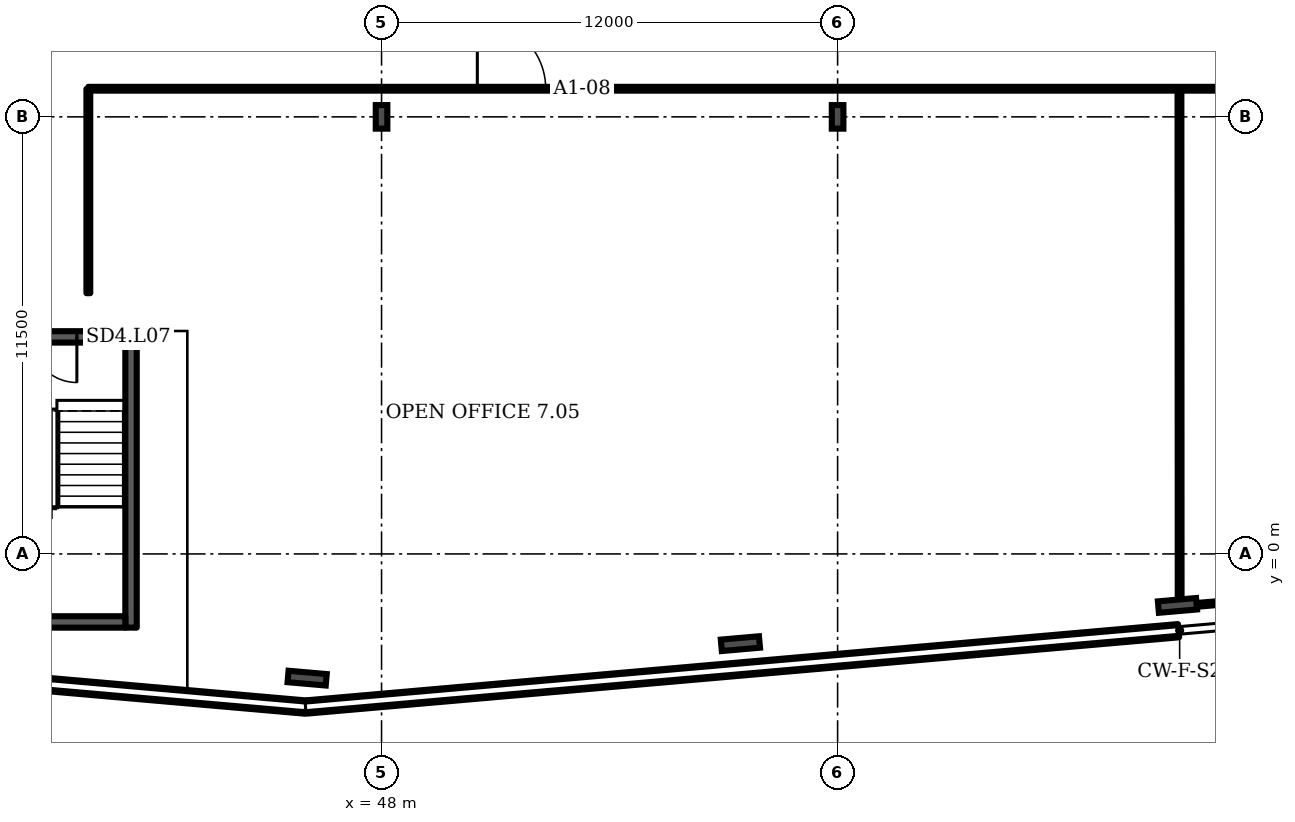
"""IFC4 building model, lengths in metres.
Left out: names, types, materials, properties, quantities, classifications, styles, units other than length and angle.
Written with IfcOpenShell. Run it as: python <this file> out.ifc"""

import sys

from ifc_helpers import new_model, si_unit, direction, frame, frame_2d, origin, origin_2d, place, context, subcontext, project, spatial, rectangle, i_section, extrude, element, fill, save


model = new_model("IFC4")
c1 = context("Model", 3, precision=1e-05, world=origin(), true_north=direction((0.0, 1.0)))
c2 = subcontext(c1, "Body", "Model", "MODEL_VIEW")
j1 = project(units=[si_unit("LENGTHUNIT", "METRE"), si_unit("PLANEANGLEUNIT", "RADIAN")], contexts=[c1])
p1 = place(None, origin())
s1 = spatial("IfcSite", under=j1, at=p1, CompositionType="ELEMENT")
p2 = place(p1, origin())
s2 = spatial("IfcBuilding", under=s1, at=p2, CompositionType="ELEMENT")
p3 = place(p2, frame((0.0, 0.0, 45.1)))
s3 = spatial("IfcBuildingStorey", under=s2, at=p3, CompositionType="ELEMENT", Elevation=45.1)
for number, where, z_axis, x_axis in (
    (1, (46.042, -3.268, 0.0), (0.0, 0.0, 1.0), (-0.087, -0.996, 0.0)),
    (2, (57.442, -2.361, 0.0), (0.0, 0.0, 1.0), (0.087, -0.996, 0.0)),
    (3, (68.942, -1.355, 0.0), (0.0, 0.0, 1.0), (0.087, -0.996, 0.0)),
):
    element("IfcColumn", number, at=place(p3, frame(where, z_axis=z_axis, x_axis=x_axis)), inside=s3, PredefinedType="COLUMN", context=c2, shape_type="SweptSolid", body=[
        extrude(i_section(OverallWidth=0.302, OverallDepth=1.008, WebThickness=0.021, FlangeThickness=0.04, FilletRadius=0.03, at=origin_2d()), origin(), (0.0, 0.0, 1.0), 3.6),
    ])
for number, where, z_axis, x_axis in (
    (4, (48.0, 11.5, 0.0), (0.0, 0.0, 1.0), (1.0, 0.0, 0.0)),
    (5, (60.0, 11.5, 0.0), (0.0, 0.0, 1.0), (1.0, 0.0, 0.0)),
):
    element("IfcColumn", number, at=place(p3, frame(where, z_axis=z_axis, x_axis=x_axis)), inside=s3, PredefinedType="COLUMN", context=c2, shape_type="SweptSolid", body=[
        extrude(i_section(OverallWidth=0.305, OverallDepth=0.62, WebThickness=0.021, FlangeThickness=0.04, FilletRadius=0.027, at=origin_2d()), origin(), (0.0, 0.0, 1.0), 3.6),
    ])
p4 = place(p3, frame((34.601, -3.032, 0.0), z_axis=(0.0, 0.0, 1.0), x_axis=(0.996193, -0.087148, 0.0)))
e6 = element("IfcWall", 6, at=p4, inside=s3, PredefinedType="SOLIDWALL", context=c2, shape_type="SweptSolid", body=[
    extrude(rectangle(XDim=11.458, YDim=0.35, at=frame_2d((5.729, 0.0))), origin(), (0.0, 0.0, 1.0), 1.0),
])
p5 = place(p3, frame((46.045, -4.026, 0.0), z_axis=(0.0, 0.0, 1.0), x_axis=(0.99619, 0.087163, 0.0)))
e7 = element("IfcWall", 7, at=p5, inside=s3, PredefinedType="SOLIDWALL", context=c2, shape_type="SweptSolid", body=[
    extrude(rectangle(XDim=23.013, YDim=0.35, at=frame_2d((11.506, 0.0))), origin(), (0.0, 0.0, 1.0), 1.0),
])
p6 = place(p3, frame((37.208, 5.711, 0.0), z_axis=(0.0, 0.0, 1.0), x_axis=(1.0, 0.0, 0.0)))
e8 = element("IfcWall", 8, at=p6, inside=s3, PredefinedType="SHEAR", context=c2, shape_type="SweptSolid", body=[
    extrude(rectangle(XDim=4.35, YDim=0.3, at=frame_2d((2.175, 0.0))), origin(), (0.0, 0.0, 1.0), 3.2),
])
p7 = place(p6, frame((1.575, 0.0, 0.0)))
e9 = element("IfcOpeningElement", 9, at=p7, cuts=e8, PredefinedType="OPENING", context=c2, shape_type="SweptSolid", body=[
    extrude(rectangle(XDim=1.2, YDim=2.1, at=frame_2d((0.6, 1.05))), frame((0.0, 0.16, 0.0), z_axis=(0.0, -1.0, 0.0), x_axis=(1.0, 0.0, 0.0)), (0.0, 0.0, 1.0), 0.32),
])
p8 = place(p3, frame((40.285, 6.861, 0.0), z_axis=(0.0, 0.0, 1.0), x_axis=(0.0, 1.0, 0.0)))
e10 = element("IfcWall", 10, at=p8, inside=s3, PredefinedType="PARTITIONING", context=c2, shape_type="SweptSolid", body=[
    extrude(rectangle(XDim=5.375, YDim=0.1, at=frame_2d((2.687, 0.0))), origin(), (0.0, 0.0, 1.0), 3.2),
])
p9 = place(p3, frame((40.285, 12.24, 0.0), z_axis=(0.0, 0.0, 1.0), x_axis=(1.0, 0.0, 0.0)))
e11 = element("IfcWall", 11, at=p9, inside=s3, PredefinedType="PARTITIONING", context=c2, shape_type="SweptSolid", body=[
    extrude(rectangle(XDim=33.255, YDim=0.1, at=frame_2d((16.627, 0.0))), origin(), (0.0, 0.0, 1.0), 3.2),
])
p10 = place(p9, frame((10.235, 0.0, 0.0)))
e12 = element("IfcOpeningElement", 12, at=p10, cuts=e11, PredefinedType="OPENING", context=c2, shape_type="SweptSolid", body=[
    extrude(rectangle(XDim=1.8, YDim=2.1, at=frame_2d((0.9, 1.05))), frame((0.0, 0.06, 0.0), z_axis=(0.0, -1.0, 0.0), x_axis=(1.0, 0.0, 0.0)), (0.0, 0.0, 1.0), 0.12),
])
p11 = place(p3, frame((69.0, -1.38, 0.0), z_axis=(0.0, 0.0, 1.0), x_axis=(-0.000359, 1.000002, 0.0)))
e13 = element("IfcWall", 13, at=p11, inside=s3, PredefinedType="PARTITIONING", context=c2, shape_type="SweptSolid", body=[
    extrude(rectangle(XDim=13.615, YDim=0.1, at=frame_2d((6.808, 0.0))), origin(), (0.0, 0.0, 1.0), 3.2),
])
p12 = place(p3, frame((69.0, -1.38, 0.0), z_axis=(0.0, 0.0, 1.0), x_axis=(0.996261, 0.086427, 0.0)))
e14 = element("IfcWall", 14, at=p12, inside=s3, PredefinedType="PARTITIONING", context=c2, shape_type="SweptSolid", body=[
    extrude(rectangle(XDim=2.181, YDim=0.1, at=frame_2d((1.09, 0.0))), origin(), (0.0, 0.0, 1.0), 2.58),
])
p13 = place(p3, frame((41.408, -1.939, 0.0), z_axis=(0.0, 0.0, 1.0), x_axis=(0.0, 1.0, 0.0)))
e15 = element("IfcWall", 15, at=p13, inside=s3, PredefinedType="SHEAR", context=c2, shape_type="SweptSolid", body=[
    extrude(rectangle(XDim=7.5, YDim=0.3, at=frame_2d((3.75, 0.0))), origin(), (0.0, 0.0, 1.0), 3.2),
])
p14 = place(p3, frame((37.508, -1.789, 0.0), z_axis=(0.0, 0.0, 1.0), x_axis=(1.0, 0.0, 0.0)))
e16 = element("IfcWall", 16, at=p14, inside=s3, PredefinedType="SHEAR", context=c2, shape_type="SweptSolid", body=[
    extrude(rectangle(XDim=3.75, YDim=0.3, at=frame_2d((1.875, 0.0))), origin(), (0.0, 0.0, 1.0), 3.2),
])
p15 = place(p7, origin())
e17 = element("IfcDoor", 17, at=p15, inside=s3, OperationType="SINGLE_SWING_RIGHT", PredefinedType="DOOR", context=c2, shape_type="SweptSolid", body=[
    extrude(rectangle(XDim=1.2, YDim=2.1, at=frame_2d((0.6, 1.05))), frame((0.0, 0.025, 0.0), z_axis=(0.0, -1.0, 0.0), x_axis=(1.0, 0.0, 0.0)), (0.0, 0.0, 1.0), 0.05),
])
fill(e9, e17)
p16 = place(p10, origin())
e18 = element("IfcDoor", 18, at=p16, inside=s3, OperationType="DOUBLE_DOOR_SINGLE_SWING", PredefinedType="DOOR", context=c2, shape_type="SweptSolid", body=[
    extrude(rectangle(XDim=1.8, YDim=2.1, at=frame_2d((0.9, 1.05))), frame((0.0, 0.025, 0.0), z_axis=(0.0, -1.0, 0.0), x_axis=(1.0, 0.0, 0.0)), (0.0, 0.0, 1.0), 0.05),
])
fill(e12, e18)
save(model, sys.argv[1])
